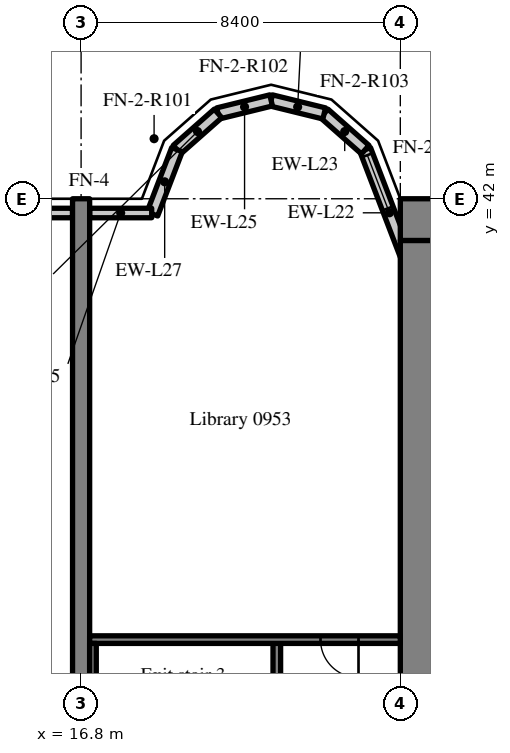
"""IFC4 building model, lengths in metres.
Left out: names, types, materials, properties, quantities, classifications, styles, units other than length and angle.
Written with IfcOpenShell. Run it as: python <this file> out.ifc"""

import sys

from ifc_helpers import new_model, si_unit, direction, frame, frame_2d, origin, place, context, subcontext, project, spatial, rectangle, extrude, source, transform, mapped, element, fill, save


model = new_model("IFC4")
c1 = context("Model", 3, precision=1e-05, world=origin(), true_north=direction((0.0, 1.0)))
c2 = subcontext(c1, "Body", "Model", "MODEL_VIEW")
j1 = project(units=[si_unit("LENGTHUNIT", "METRE"), si_unit("PLANEANGLEUNIT", "RADIAN")], contexts=[c1])
p1 = place(None, origin())
s1 = spatial("IfcSite", under=j1, at=p1, CompositionType="ELEMENT")
p2 = place(p1, origin())
s2 = spatial("IfcBuilding", under=s1, at=p2, CompositionType="ELEMENT")
p3 = place(p2, frame((0.0, 0.0, 43.0)))
s3 = spatial("IfcBuildingStorey", under=s2, at=p3, CompositionType="ELEMENT", Elevation=43.0)
m1 = source(origin(), c2, "Body", "SweptSolid", [
    extrude(rectangle(XDim=50.4, YDim=1.1, at=frame_2d((25.2, 0.0))), origin(), (0.0, 0.0, 1.0), 3.52),
])
p4 = place(p3, frame((25.2, 41.45, 0.0), z_axis=(0.0, 0.0, 1.0), x_axis=(1.0, 0.0, 0.0)))
e1 = element("IfcWall", 1, at=p4, inside=s3, PredefinedType="SHEAR", context=c2, shape_type="MappedRepresentation", body=[
    mapped(m1, transform((0.0, 0.0, 0.0), scale=1.0)),
])
m2 = source(origin(), c2, "Body", "SweptSolid", [
    extrude(rectangle(XDim=17.8, YDim=1.1, at=frame_2d((8.9, 0.0))), origin(), (0.0, 0.0, 1.0), 3.52),
])
p5 = place(p3, frame((25.75, 23.1, 0.0), z_axis=(0.0, 0.0, 1.0), x_axis=(0.0, 1.0, 0.0)))
e2 = element("IfcWall", 2, at=p5, inside=s3, PredefinedType="SHEAR", context=c2, shape_type="MappedRepresentation", body=[
    mapped(m2, transform((0.0, 0.0, 0.0), scale=1.0)),
])
m3 = source(origin(), c2, "Body", "SweptSolid", [
    extrude(rectangle(XDim=20.0, YDim=0.45, at=frame_2d((10.0, 0.0))), origin(), (0.0, 0.0, 1.0), 3.52),
])
p6 = place(p3, frame((16.8, 22.0, 0.0), z_axis=(0.0, 0.0, 1.0), x_axis=(0.0, 1.0, 0.0)))
e3 = element("IfcWall", 3, at=p6, inside=s3, PredefinedType="SHEAR", context=c2, shape_type="MappedRepresentation", body=[
    mapped(m3, transform((0.0, 0.0, 0.0), scale=1.0)),
])
m4 = source(origin(), c2, "Body", "SweptSolid", [
    extrude(rectangle(XDim=3.559, YDim=0.3, at=frame_2d((1.78, 0.0))), origin(), (0.0, 0.0, 1.0), 3.52),
])
p7 = place(p3, frame((25.55, 39.969, 0.0), z_axis=(0.0, 0.0, 1.0), x_axis=(-0.35779745313, 0.933799219604, 0.0)))
e4 = element("IfcWall", 4, at=p7, inside=s3, PredefinedType="SOLIDWALL", context=c2, shape_type="MappedRepresentation", body=[
    mapped(m4, transform((0.0, 0.0, 0.0), scale=1.0)),
])
m5 = source(origin(), c2, "Body", "SweptSolid", [
    extrude(rectangle(XDim=1.5, YDim=2.0, at=frame_2d((0.75, 1.0))), frame((0.0, 0.16, 0.0), z_axis=(0.0, -1.0, 0.0), x_axis=(1.0, 0.0, 0.0)), (0.0, 0.0, 1.0), 0.32),
])
p8 = place(p7, frame((1.903, 0.0, 0.9)))
e5 = element("IfcOpeningElement", 5, at=p8, cuts=e4, PredefinedType="OPENING", context=c2, shape_type="MappedRepresentation", body=[
    mapped(m5, transform((0.0, 0.0, 0.0), scale=1.0)),
])
m6 = source(origin(), c2, "Body", "SweptSolid", [
    extrude(rectangle(XDim=1.44, YDim=0.3, at=frame_2d((0.72, 0.0))), origin(), (0.0, 0.0, 1.0), 3.52),
])
p9 = place(p3, frame((24.277, 43.292, 0.0), z_axis=(0.0, 0.0, 1.0), x_axis=(-0.749649827867, 0.661834673902, 0.0)))
e6 = element("IfcWall", 6, at=p9, inside=s3, PredefinedType="SOLIDWALL", context=c2, shape_type="MappedRepresentation", body=[
    mapped(m6, transform((0.0, 0.0, 0.0), scale=1.0)),
])
m7 = source(origin(), c2, "Body", "SweptSolid", [
    extrude(rectangle(XDim=1.438, YDim=0.3, at=frame_2d((0.719, 0.0))), origin(), (0.0, 0.0, 1.0), 3.52),
])
p10 = place(p3, frame((23.197, 44.245, 0.0), z_axis=(0.0, 0.0, 1.0), x_axis=(-0.971152283879, 0.238460146601, 0.0)))
e7 = element("IfcWall", 7, at=p10, inside=s3, PredefinedType="SOLIDWALL", context=c2, shape_type="MappedRepresentation", body=[
    mapped(m7, transform((0.0, 0.0, 0.0), scale=1.0)),
])
m8 = source(origin(), c2, "Body", "SweptSolid", [
    extrude(rectangle(XDim=1.439, YDim=0.3, at=frame_2d((0.719, 0.0))), origin(), (0.0, 0.0, 1.0), 3.52),
])
p11 = place(p3, frame((21.8, 44.588, 0.0), z_axis=(0.0, 0.0, 1.0), x_axis=(-0.971161932466, -0.238420848351, 0.0)))
e8 = element("IfcWall", 8, at=p11, inside=s3, PredefinedType="SOLIDWALL", context=c2, shape_type="MappedRepresentation", body=[
    mapped(m8, transform((0.0, 0.0, 0.0), scale=1.0)),
])
m9 = source(origin(), c2, "Body", "SweptSolid", [
    extrude(rectangle(XDim=1.44, YDim=0.3, at=frame_2d((0.72, 0.0))), origin(), (0.0, 0.0, 1.0), 3.52),
])
p12 = place(p3, frame((20.403, 44.245, 0.0), z_axis=(0.0, 0.0, 1.0), x_axis=(-0.74957555648, -0.661918790432, 0.0)))
e9 = element("IfcWall", 9, at=p12, inside=s3, PredefinedType="SOLIDWALL", context=c2, shape_type="MappedRepresentation", body=[
    mapped(m9, transform((0.0, 0.0, 0.0), scale=1.0)),
])
m10 = source(origin(), c2, "Body", "SweptSolid", [
    extrude(rectangle(XDim=1.812, YDim=0.3, at=frame_2d((0.906, 0.0))), origin(), (0.0, 0.0, 1.0), 3.52),
])
p13 = place(p3, frame((19.323, 43.292, 0.0), z_axis=(0.0, 0.0, 1.0), x_axis=(-0.357877270961, -0.93376863244, 0.0)))
e10 = element("IfcWall", 10, at=p13, inside=s3, PredefinedType="SOLIDWALL", context=c2, shape_type="MappedRepresentation", body=[
    mapped(m10, transform((0.0, 0.0, 0.0), scale=1.0)),
])
m11 = source(origin(), c2, "Body", "SweptSolid", [
    extrude(rectangle(XDim=3.525, YDim=0.25, at=frame_2d((1.762, 0.0))), origin(), (0.0, 0.0, 1.0), 2.82),
])
p14 = place(p3, frame((16.575, 41.625, 0.0), z_axis=(0.0, 0.0, 1.0), x_axis=(-1.0, 0.0, 0.0)))
e11 = element("IfcWall", 11, at=p14, inside=s3, PredefinedType="SOLIDWALL", context=c2, shape_type="MappedRepresentation", body=[
    mapped(m11, transform((0.0, 0.0, 0.0), scale=1.0)),
])
m12 = source(origin(), c2, "Body", "SweptSolid", [
    extrude(rectangle(XDim=1.5, YDim=1.5, at=frame_2d((0.75, 0.75))), frame((0.0, 0.135, 0.0), z_axis=(0.0, -1.0, 0.0), x_axis=(1.0, 0.0, 0.0)), (0.0, 0.0, 1.0), 0.27),
])
p15 = place(p14, frame((1.012, 0.0, 0.9)))
e12 = element("IfcOpeningElement", 12, at=p15, cuts=e11, PredefinedType="OPENING", context=c2, shape_type="MappedRepresentation", body=[
    mapped(m12, transform((0.0, 0.0, 0.0), scale=1.0)),
])
m13 = source(origin(), c2, "Body", "SweptSolid", [
    extrude(rectangle(XDim=1.633, YDim=0.25, at=frame_2d((0.816, 0.0))), origin(), (0.0, 0.0, 1.0), 2.82),
])
p16 = place(p3, frame((18.658, 41.625, 0.0), z_axis=(0.0, 0.0, 1.0), x_axis=(-1.0, 0.0, 0.0)))
e13 = element("IfcWall", 13, at=p16, inside=s3, PredefinedType="SOLIDWALL", context=c2, shape_type="MappedRepresentation", body=[
    mapped(m13, transform((0.0, 0.0, 0.0), scale=1.0)),
])
m14 = source(origin(), c2, "Body", "SweptSolid", [
    extrude(rectangle(XDim=8.3, YDim=0.2, at=frame_2d((4.15, 0.0))), origin(), (0.0, 0.0, 1.0), 3.52),
])
p17 = place(p3, frame((21.95, 22.1, 0.0), z_axis=(0.0, 0.0, 1.0), x_axis=(0.0, 1.0, 0.0)))
e14 = element("IfcWall", 14, at=p17, inside=s3, PredefinedType="SOLIDWALL", context=c2, shape_type="MappedRepresentation", body=[
    mapped(m14, transform((0.0, 0.0, 0.0), scale=1.0)),
])
m15 = source(origin(), c2, "Body", "SweptSolid", [
    extrude(rectangle(XDim=1.2, YDim=2.1, at=frame_2d((0.6, 1.05))), frame((0.0, 0.11, 0.0), z_axis=(0.0, -1.0, 0.0), x_axis=(1.0, 0.0, 0.0)), (0.0, 0.0, 1.0), 0.22),
])
p18 = place(p17, frame((0.6, 0.0, 0.0)))
e15 = element("IfcOpeningElement", 15, at=p18, cuts=e14, PredefinedType="OPENING", context=c2, shape_type="MappedRepresentation", body=[
    mapped(m15, transform((0.0, 0.0, 0.0), scale=1.0)),
])
m16 = source(origin(), c2, "Body", "SweptSolid", [
    extrude(rectangle(XDim=8.175, YDim=0.2, at=frame_2d((4.087, 0.0))), origin(), (0.0, 0.0, 1.0), 3.52),
])
p19 = place(p3, frame((17.025, 30.4, 0.0), z_axis=(0.0, 0.0, 1.0), x_axis=(1.0, 0.0, 0.0)))
e16 = element("IfcWall", 16, at=p19, inside=s3, PredefinedType="SOLIDWALL", context=c2, shape_type="MappedRepresentation", body=[
    mapped(m16, transform((0.0, 0.0, 0.0), scale=1.0)),
])
m17 = source(origin(), c2, "Body", "SweptSolid", [
    extrude(rectangle(XDim=1.0, YDim=2.1, at=frame_2d((0.5, 1.05))), frame((0.0, 0.11, 0.0), z_axis=(0.0, -1.0, 0.0), x_axis=(1.0, 0.0, 0.0)), (0.0, 0.0, 1.0), 0.22),
])
p20 = place(p19, frame((6.075, 0.0, 0.0)))
e17 = element("IfcOpeningElement", 17, at=p20, cuts=e16, PredefinedType="OPENING", context=c2, shape_type="MappedRepresentation", body=[
    mapped(m17, transform((0.0, 0.0, 0.0), scale=1.0)),
])
m18 = source(origin(), c2, "Body", "SweptSolid", [
    extrude(rectangle(XDim=8.1, YDim=0.175, at=frame_2d((4.05, 0.0))), origin(), (0.0, 0.0, 1.0), 3.52),
])
p21 = place(p3, frame((17.112, 22.2, 0.0), z_axis=(0.0, 0.0, 1.0), x_axis=(0.0, 1.0, 0.0)))
e18 = element("IfcWall", 18, at=p21, inside=s3, PredefinedType="SOLIDWALL", context=c2, shape_type="MappedRepresentation", body=[
    mapped(m18, transform((0.0, 0.0, 0.0), scale=1.0)),
])
m19 = source(origin(), c2, "Body", "SweptSolid", [
    extrude(rectangle(XDim=1.5, YDim=2.0, at=frame_2d((0.75, 1.0))), frame((0.0, 0.03, 0.0), z_axis=(0.0, -1.0, 0.0), x_axis=(1.0, 0.0, 0.0)), (0.0, 0.0, 1.0), 0.06),
])
p22 = place(p8, origin())
e19 = element("IfcWindow", 19, at=p22, inside=s3, PartitioningType="SINGLE_PANEL", PredefinedType="WINDOW", context=c2, shape_type="MappedRepresentation", body=[
    mapped(m19, transform((0.0, 0.0, 0.0), scale=1.0)),
])
fill(e5, e19)
m20 = source(origin(), c2, "Body", "SweptSolid", [
    extrude(rectangle(XDim=1.0, YDim=2.1, at=frame_2d((0.5, 1.05))), frame((0.0, 0.025, 0.0), z_axis=(0.0, -1.0, 0.0), x_axis=(1.0, 0.0, 0.0)), (0.0, 0.0, 1.0), 0.05),
])
p23 = place(p20, origin())
e20 = element("IfcDoor", 20, at=p23, inside=s3, OperationType="SINGLE_SWING_RIGHT", PredefinedType="DOOR", context=c2, shape_type="MappedRepresentation", body=[
    mapped(m20, transform((0.0, 0.0, 0.0), scale=1.0)),
])
fill(e17, e20)
save(model, sys.argv[1])
